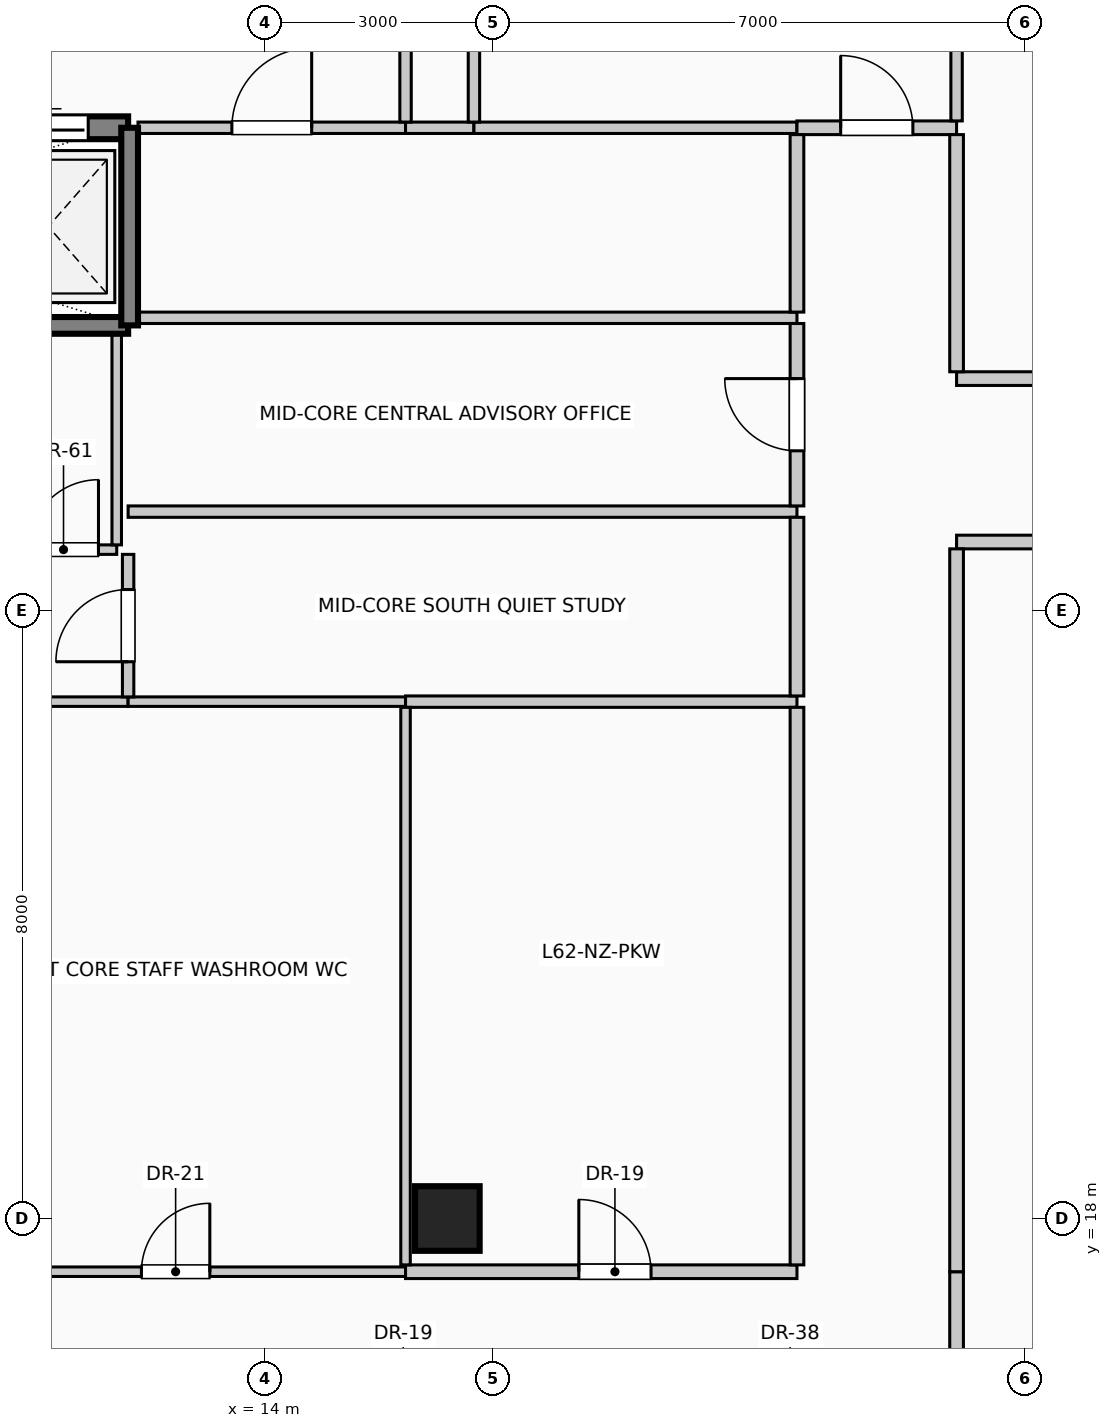
"""IFC4 building model, lengths in metres.
Left out: names, types, materials, properties, quantities, classifications, styles, units other than length and angle.
Written with IfcOpenShell. Run it as: python <this file> out.ifc"""

import sys

from ifc_helpers import new_model, si_unit, direction, frame, frame_2d, origin, origin_2d, place, context, subcontext, project, spatial, rectangle, circle, extrude, element, fill, save


model = new_model("IFC4")
c1 = context("Model", 3, precision=1e-05, world=origin(), true_north=direction((0.0, 1.0)))
c2 = subcontext(c1, "Body", "Model", "MODEL_VIEW")
j1 = project(units=[si_unit("LENGTHUNIT", "METRE"), si_unit("PLANEANGLEUNIT", "RADIAN")], contexts=[c1])
p1 = place(None, origin())
s1 = spatial("IfcSite", under=j1, at=p1, CompositionType="ELEMENT")
p2 = place(p1, origin())
s2 = spatial("IfcBuilding", under=s1, at=p2, CompositionType="ELEMENT")
p3 = place(p2, frame((0.0, 0.0, 256.6)))
s3 = spatial("IfcBuildingStorey", under=s2, at=p3, CompositionType="ELEMENT", Elevation=256.6)
p4 = place(p3, frame((16.4, 18.0, 0.0), z_axis=(0.0, 0.0, 1.0), x_axis=(1.0, 0.0, 0.0)))
e1 = element("IfcColumn", 1, at=p4, inside=s3, PredefinedType="COLUMN", context=c2, shape_type="SweptSolid", body=[
    extrude(circle(Radius=0.425, at=origin_2d()), origin(), (0.0, 0.0, 1.0), 4.0),
])
p5 = place(p3, frame((10.05, 32.35, 0.0), z_axis=(0.0, 0.0, 1.0), x_axis=(1.0, 0.0, 0.0)))
e2 = element("IfcWall", 2, at=p5, inside=s3, PredefinedType="SOLIDWALL", context=c2, shape_type="SweptSolid", body=[
    extrude(rectangle(XDim=2.15, YDim=0.3, at=frame_2d((1.075, 0.0))), origin(), (0.0, 0.0, 1.0), 4.0),
])
p6 = place(p5, frame((0.525, 0.0, 0.0)))
e3 = element("IfcOpeningElement", 3, at=p6, cuts=e2, PredefinedType="OPENING", context=c2, shape_type="SweptSolid", body=[
    extrude(rectangle(XDim=1.1, YDim=2.2, at=frame_2d((0.55, 1.1))), frame((0.0, 0.16, 0.0), z_axis=(0.0, -1.0, 0.0), x_axis=(1.0, 0.0, 0.0)), (0.0, 0.0, 1.0), 0.32),
])
p7 = place(p3, frame((3.55, 29.75, 0.0), z_axis=(0.0, 0.0, 1.0), x_axis=(1.0, 0.0, 0.0)))
e4 = element("IfcWall", 4, at=p7, inside=s3, PredefinedType="SOLIDWALL", context=c2, shape_type="SweptSolid", body=[
    extrude(rectangle(XDim=8.65, YDim=0.22, at=frame_2d((4.325, 0.0))), origin(), (0.0, 0.0, 1.0), 4.0),
])
p8 = place(p3, frame((12.22, 29.75, 0.0), z_axis=(0.0, 0.0, 1.0), x_axis=(0.0, 1.0, 0.0)))
e5 = element("IfcWall", 5, at=p8, inside=s3, PredefinedType="SOLIDWALL", context=c2, shape_type="SweptSolid", body=[
    extrude(rectangle(XDim=2.6, YDim=0.22, at=frame_2d((1.3, 0.0))), origin(), (0.0, 0.0, 1.0), 4.0),
])
p9 = place(p3, frame((9.8, 17.3, 0.0), z_axis=(0.0, 0.0, 1.0), x_axis=(1.0, 0.0, 0.0)))
e6 = element("IfcWall", 6, at=p9, inside=s3, PredefinedType="PARTITIONING", context=c2, shape_type="SweptSolid", body=[
    extrude(rectangle(XDim=6.05, YDim=0.125, at=frame_2d((3.025, 0.0))), origin(), (0.0, 0.0, 1.0), 3.75),
])
p10 = place(p9, frame((2.575, 0.0, 0.0)))
e7 = element("IfcOpeningElement", 7, at=p10, cuts=e6, PredefinedType="OPENING", context=c2, shape_type="SweptSolid", body=[
    extrude(rectangle(XDim=0.9, YDim=2.1, at=frame_2d((0.45, 1.05))), frame((0.0, 0.073, 0.0), z_axis=(0.0, -1.0, 0.0), x_axis=(1.0, 0.0, 0.0)), (0.0, 0.0, 1.0), 0.145),
])
p11 = place(p3, frame((15.85, 17.3, 0.0), z_axis=(0.0, 0.0, 1.0), x_axis=(1.0, 0.0, 0.0)))
e8 = element("IfcWall", 8, at=p11, inside=s3, PredefinedType="PARTITIONING", context=c2, shape_type="SweptSolid", body=[
    extrude(rectangle(XDim=5.15, YDim=0.18, at=frame_2d((2.575, 0.0))), origin(), (0.0, 0.0, 1.0), 3.75),
])
p12 = place(p11, frame((2.28, 0.0, 0.0)))
e9 = element("IfcOpeningElement", 9, at=p12, cuts=e8, PredefinedType="OPENING", context=c2, shape_type="SweptSolid", body=[
    extrude(rectangle(XDim=0.95, YDim=2.15, at=frame_2d((0.475, 1.075))), frame((0.0, 0.1, 0.0), z_axis=(0.0, -1.0, 0.0), x_axis=(1.0, 0.0, 0.0)), (0.0, 0.0, 1.0), 0.2),
])
p13 = place(p3, frame((9.8, 24.8, 0.0), z_axis=(0.0, 0.0, 1.0), x_axis=(1.0, 0.0, 0.0)))
e10 = element("IfcWall", 10, at=p13, inside=s3, PredefinedType="PARTITIONING", context=c2, shape_type="SweptSolid", body=[
    extrude(rectangle(XDim=2.4, YDim=0.125, at=frame_2d((1.2, 0.0))), origin(), (0.0, 0.0, 1.0), 3.75),
])
p14 = place(p3, frame((12.2, 24.8, 0.0), z_axis=(0.0, 0.0, 1.0), x_axis=(1.0, 0.0, 0.0)))
e11 = element("IfcWall", 11, at=p14, inside=s3, PredefinedType="PARTITIONING", context=c2, shape_type="SweptSolid", body=[
    extrude(rectangle(XDim=3.65, YDim=0.125, at=frame_2d((1.825, 0.0))), origin(), (0.0, 0.0, 1.0), 3.75),
])
p15 = place(p3, frame((15.85, 24.8, 0.0), z_axis=(0.0, 0.0, 1.0), x_axis=(1.0, 0.0, 0.0)))
e12 = element("IfcWall", 12, at=p15, inside=s3, PredefinedType="PARTITIONING", context=c2, shape_type="SweptSolid", body=[
    extrude(rectangle(XDim=5.15, YDim=0.15, at=frame_2d((2.575, 0.0))), origin(), (0.0, 0.0, 1.0), 3.75),
])
p16 = place(p3, frame((10.65, 26.8, 0.0), z_axis=(0.0, 0.0, 1.0), x_axis=(1.0, 0.0, 0.0)))
e13 = element("IfcWall", 13, at=p16, inside=s3, PredefinedType="PARTITIONING", context=c2, shape_type="SweptSolid", body=[
    extrude(rectangle(XDim=1.4, YDim=0.125, at=frame_2d((0.7, 0.0))), origin(), (0.0, 0.0, 1.0), 3.75),
])
p17 = place(p16, frame((0.24, 0.0, 0.0)))
e14 = element("IfcOpeningElement", 14, at=p17, cuts=e13, PredefinedType="OPENING", context=c2, shape_type="SweptSolid", body=[
    extrude(rectangle(XDim=0.92, YDim=2.1, at=frame_2d((0.46, 1.05))), frame((0.0, 0.073, 0.0), z_axis=(0.0, -1.0, 0.0), x_axis=(1.0, 0.0, 0.0)), (0.0, 0.0, 1.0), 0.145),
])
p18 = place(p3, frame((23.1, 26.9, 0.0), z_axis=(0.0, 0.0, 1.0), x_axis=(1.0, 0.0, 0.0)))
e15 = element("IfcWall", 15, at=p18, inside=s3, PredefinedType="PARTITIONING", context=c2, shape_type="SweptSolid", body=[
    extrude(rectangle(XDim=9.02, YDim=0.18, at=frame_2d((4.51, 0.0))), origin(), (0.0, 0.0, 1.0), 3.75),
])
p19 = place(p18, frame((4.035, 0.0, 0.0)))
e16 = element("IfcOpeningElement", 16, at=p19, cuts=e15, PredefinedType="OPENING", context=c2, shape_type="SweptSolid", body=[
    extrude(rectangle(XDim=0.95, YDim=2.15, at=frame_2d((0.475, 1.075))), frame((0.0, 0.1, 0.0), z_axis=(0.0, -1.0, 0.0), x_axis=(1.0, 0.0, 0.0)), (0.0, 0.0, 1.0), 0.2),
])
p20 = place(p3, frame((12.2, 27.3, 0.0), z_axis=(0.0, 0.0, 1.0), x_axis=(1.0, 0.0, 0.0)))
e17 = element("IfcWall", 17, at=p20, inside=s3, PredefinedType="PARTITIONING", context=c2, shape_type="SweptSolid", body=[
    extrude(rectangle(XDim=8.8, YDim=0.15, at=frame_2d((4.4, 0.0))), origin(), (0.0, 0.0, 1.0), 3.75),
])
p21 = place(p3, frame((23.1, 29.05, 0.0), z_axis=(0.0, 0.0, 1.0), x_axis=(1.0, 0.0, 0.0)))
e18 = element("IfcWall", 18, at=p21, inside=s3, PredefinedType="PARTITIONING", context=c2, shape_type="SweptSolid", body=[
    extrude(rectangle(XDim=7.33, YDim=0.18, at=frame_2d((3.665, 0.0))), origin(), (0.0, 0.0, 1.0), 3.75),
])
p22 = place(p21, frame((3.14, 0.0, 0.0)))
e19 = element("IfcOpeningElement", 19, at=p22, cuts=e18, PredefinedType="OPENING", context=c2, shape_type="SweptSolid", body=[
    extrude(rectangle(XDim=1.05, YDim=2.15, at=frame_2d((0.525, 1.075))), frame((0.0, 0.1, 0.0), z_axis=(0.0, -1.0, 0.0), x_axis=(1.0, 0.0, 0.0)), (0.0, 0.0, 1.0), 0.2),
])
p23 = place(p3, frame((12.33, 29.85, 0.0), z_axis=(0.0, 0.0, 1.0), x_axis=(1.0, 0.0, 0.0)))
e20 = element("IfcWall", 20, at=p23, inside=s3, PredefinedType="PARTITIONING", context=c2, shape_type="SweptSolid", body=[
    extrude(rectangle(XDim=8.67, YDim=0.15, at=frame_2d((4.335, 0.0))), origin(), (0.0, 0.0, 1.0), 3.75),
])
p24 = place(p3, frame((12.33, 32.35, 0.0), z_axis=(0.0, 0.0, 1.0), x_axis=(1.0, 0.0, 0.0)))
e21 = element("IfcWall", 21, at=p24, inside=s3, PredefinedType="PARTITIONING", context=c2, shape_type="SweptSolid", body=[
    extrude(rectangle(XDim=3.52, YDim=0.15, at=frame_2d((1.76, 0.0))), origin(), (0.0, 0.0, 1.0), 3.75),
])
p25 = place(p24, frame((1.235, 0.0, 0.0)))
e22 = element("IfcOpeningElement", 22, at=p25, cuts=e21, PredefinedType="OPENING", context=c2, shape_type="SweptSolid", body=[
    extrude(rectangle(XDim=1.05, YDim=2.15, at=frame_2d((0.525, 1.075))), frame((0.0, 0.085, 0.0), z_axis=(0.0, -1.0, 0.0), x_axis=(1.0, 0.0, 0.0)), (0.0, 0.0, 1.0), 0.17),
])
p26 = place(p3, frame((15.85, 32.35, 0.0), z_axis=(0.0, 0.0, 1.0), x_axis=(1.0, 0.0, 0.0)))
e23 = element("IfcWall", 23, at=p26, inside=s3, PredefinedType="PARTITIONING", context=c2, shape_type="SweptSolid", body=[
    extrude(rectangle(XDim=0.9, YDim=0.15, at=frame_2d((0.45, 0.0))), origin(), (0.0, 0.0, 1.0), 3.75),
])
p27 = place(p3, frame((16.75, 32.35, 0.0), z_axis=(0.0, 0.0, 1.0), x_axis=(1.0, 0.0, 0.0)))
e24 = element("IfcWall", 24, at=p27, inside=s3, PredefinedType="PARTITIONING", context=c2, shape_type="SweptSolid", body=[
    extrude(rectangle(XDim=4.25, YDim=0.15, at=frame_2d((2.125, 0.0))), origin(), (0.0, 0.0, 1.0), 3.75),
])
p28 = place(p3, frame((21.0, 32.35, 0.0), z_axis=(0.0, 0.0, 1.0), x_axis=(1.0, 0.0, 0.0)))
e25 = element("IfcWall", 25, at=p28, inside=s3, PredefinedType="PARTITIONING", context=c2, shape_type="SweptSolid", body=[
    extrude(rectangle(XDim=2.1, YDim=0.18, at=frame_2d((1.05, 0.0))), origin(), (0.0, 0.0, 1.0), 3.75),
])
p29 = place(p28, frame((0.575, 0.0, 0.0)))
e26 = element("IfcOpeningElement", 26, at=p29, cuts=e25, PredefinedType="OPENING", context=c2, shape_type="SweptSolid", body=[
    extrude(rectangle(XDim=0.95, YDim=2.15, at=frame_2d((0.475, 1.075))), frame((0.0, 0.1, 0.0), z_axis=(0.0, -1.0, 0.0), x_axis=(1.0, 0.0, 0.0)), (0.0, 0.0, 1.0), 0.2),
])
p30 = place(p3, frame((12.05, 26.863, 0.0), z_axis=(0.0, 0.0, 1.0), x_axis=(0.0, 1.0, 0.0)))
e27 = element("IfcWall", 27, at=p30, inside=s3, PredefinedType="PARTITIONING", context=c2, shape_type="SweptSolid", body=[
    extrude(rectangle(XDim=2.777, YDim=0.125, at=frame_2d((1.389, 0.0))), origin(), (0.0, 0.0, 1.0), 3.75),
])
p31 = place(p3, frame((12.2, 24.863, 0.0), z_axis=(0.0, 0.0, 1.0), x_axis=(0.0, 1.0, 0.0)))
e28 = element("IfcWall", 28, at=p31, inside=s3, PredefinedType="PARTITIONING", context=c2, shape_type="SweptSolid", body=[
    extrude(rectangle(XDim=1.875, YDim=0.15, at=frame_2d((0.938, 0.0))), origin(), (0.0, 0.0, 1.0), 3.75),
])
p32 = place(p31, frame((0.462, 0.0, 0.0)))
e29 = element("IfcOpeningElement", 29, at=p32, cuts=e28, PredefinedType="OPENING", context=c2, shape_type="SweptSolid", body=[
    extrude(rectangle(XDim=0.95, YDim=2.15, at=frame_2d((0.475, 1.075))), frame((0.0, 0.085, 0.0), z_axis=(0.0, -1.0, 0.0), x_axis=(1.0, 0.0, 0.0)), (0.0, 0.0, 1.0), 0.17),
])
p33 = place(p3, frame((15.85, 17.39, 0.0), z_axis=(0.0, 0.0, 1.0), x_axis=(0.0, 1.0, 0.0)))
e30 = element("IfcWall", 30, at=p33, inside=s3, PredefinedType="PARTITIONING", context=c2, shape_type="SweptSolid", body=[
    extrude(rectangle(XDim=7.335, YDim=0.125, at=frame_2d((3.667, 0.0))), origin(), (0.0, 0.0, 1.0), 3.75),
])
p34 = place(p3, frame((15.85, 32.425, 0.0), z_axis=(0.0, 0.0, 1.0), x_axis=(0.0, 1.0, 0.0)))
e31 = element("IfcWall", 31, at=p34, inside=s3, PredefinedType="PARTITIONING", context=c2, shape_type="SweptSolid", body=[
    extrude(rectangle(XDim=1.725, YDim=0.15, at=frame_2d((0.862, 0.0))), origin(), (0.0, 0.0, 1.0), 3.75),
])
p35 = place(p3, frame((16.75, 32.425, 0.0), z_axis=(0.0, 0.0, 1.0), x_axis=(0.0, 1.0, 0.0)))
e32 = element("IfcWall", 32, at=p35, inside=s3, PredefinedType="PARTITIONING", context=c2, shape_type="SweptSolid", body=[
    extrude(rectangle(XDim=1.15, YDim=0.15, at=frame_2d((0.575, 0.0))), origin(), (0.0, 0.0, 1.0), 3.75),
])
p36 = place(p3, frame((21.0, 17.39, 0.0), z_axis=(0.0, 0.0, 1.0), x_axis=(0.0, 1.0, 0.0)))
e33 = element("IfcWall", 33, at=p36, inside=s3, PredefinedType="PARTITIONING", context=c2, shape_type="SweptSolid", body=[
    extrude(rectangle(XDim=7.335, YDim=0.18, at=frame_2d((3.667, 0.0))), origin(), (0.0, 0.0, 1.0), 3.75),
])
p37 = place(p3, frame((21.0, 24.875, 0.0), z_axis=(0.0, 0.0, 1.0), x_axis=(0.0, 1.0, 0.0)))
e34 = element("IfcWall", 34, at=p37, inside=s3, PredefinedType="PARTITIONING", context=c2, shape_type="SweptSolid", body=[
    extrude(rectangle(XDim=2.35, YDim=0.18, at=frame_2d((1.175, 0.0))), origin(), (0.0, 0.0, 1.0), 3.75),
])
p38 = place(p3, frame((21.0, 27.375, 0.0), z_axis=(0.0, 0.0, 1.0), x_axis=(0.0, 1.0, 0.0)))
e35 = element("IfcWall", 35, at=p38, inside=s3, PredefinedType="PARTITIONING", context=c2, shape_type="SweptSolid", body=[
    extrude(rectangle(XDim=2.4, YDim=0.18, at=frame_2d((1.2, 0.0))), origin(), (0.0, 0.0, 1.0), 3.75),
])
p39 = place(p38, frame((0.725, 0.0, 0.0)))
e36 = element("IfcOpeningElement", 36, at=p39, cuts=e35, PredefinedType="OPENING", context=c2, shape_type="SweptSolid", body=[
    extrude(rectangle(XDim=0.95, YDim=2.15, at=frame_2d((0.475, 1.075))), frame((0.0, 0.1, 0.0), z_axis=(0.0, -1.0, 0.0), x_axis=(1.0, 0.0, 0.0)), (0.0, 0.0, 1.0), 0.2),
])
p40 = place(p3, frame((21.0, 29.925, 0.0), z_axis=(0.0, 0.0, 1.0), x_axis=(0.0, 1.0, 0.0)))
e37 = element("IfcWall", 37, at=p40, inside=s3, PredefinedType="PARTITIONING", context=c2, shape_type="SweptSolid", body=[
    extrude(rectangle(XDim=2.335, YDim=0.18, at=frame_2d((1.167, 0.0))), origin(), (0.0, 0.0, 1.0), 3.75),
])
p41 = place(p3, frame((23.1, 15.29, 0.0), z_axis=(0.0, 0.0, 1.0), x_axis=(0.0, 1.0, 0.0)))
e38 = element("IfcWall", 38, at=p41, inside=s3, PredefinedType="PARTITIONING", context=c2, shape_type="SweptSolid", body=[
    extrude(rectangle(XDim=2.01, YDim=0.18, at=frame_2d((1.005, 0.0))), origin(), (0.0, 0.0, 1.0), 3.75),
])
p42 = place(p3, frame((23.1, 17.3, 0.0), z_axis=(0.0, 0.0, 1.0), x_axis=(0.0, 1.0, 0.0)))
e39 = element("IfcWall", 39, at=p42, inside=s3, PredefinedType="PARTITIONING", context=c2, shape_type="SweptSolid", body=[
    extrude(rectangle(XDim=9.51, YDim=0.18, at=frame_2d((4.755, 0.0))), origin(), (0.0, 0.0, 1.0), 3.75),
])
p43 = place(p3, frame((23.1, 29.14, 0.0), z_axis=(0.0, 0.0, 1.0), x_axis=(0.0, 1.0, 0.0)))
e40 = element("IfcWall", 40, at=p43, inside=s3, PredefinedType="PARTITIONING", context=c2, shape_type="SweptSolid", body=[
    extrude(rectangle(XDim=3.12, YDim=0.18, at=frame_2d((1.56, 0.0))), origin(), (0.0, 0.0, 1.0), 3.75),
])
p44 = place(p3, frame((23.1, 32.44, 0.0), z_axis=(0.0, 0.0, 1.0), x_axis=(0.0, 1.0, 0.0)))
e41 = element("IfcWall", 41, at=p44, inside=s3, PredefinedType="PARTITIONING", context=c2, shape_type="SweptSolid", body=[
    extrude(rectangle(XDim=12.84, YDim=0.15, at=frame_2d((6.42, 0.0))), origin(), (0.0, 0.0, 1.0), 3.75),
])
p45 = place(p6, origin())
e42 = element("IfcDoor", 42, at=p45, inside=s3, OperationType="SLIDING_TO_RIGHT", PredefinedType="DOOR", context=c2, shape_type="SweptSolid", body=[
    extrude(rectangle(XDim=1.1, YDim=2.2, at=frame_2d((0.55, 1.1))), frame((0.0, 0.025, 0.0), z_axis=(0.0, -1.0, 0.0), x_axis=(1.0, 0.0, 0.0)), (0.0, 0.0, 1.0), 0.05),
])
fill(e3, e42)
p46 = place(p10, origin())
e43 = element("IfcDoor", 43, at=p46, inside=s3, OperationType="SINGLE_SWING_RIGHT", PredefinedType="DOOR", context=c2, shape_type="SweptSolid", body=[
    extrude(rectangle(XDim=0.9, YDim=2.1, at=frame_2d((0.45, 1.05))), frame((0.0, 0.025, 0.0), z_axis=(0.0, -1.0, 0.0), x_axis=(1.0, 0.0, 0.0)), (0.0, 0.0, 1.0), 0.05),
])
fill(e7, e43)
p47 = place(p12, origin())
e44 = element("IfcDoor", 44, at=p47, inside=s3, OperationType="SINGLE_SWING_LEFT", PredefinedType="DOOR", context=c2, shape_type="SweptSolid", body=[
    extrude(rectangle(XDim=0.95, YDim=2.15, at=frame_2d((0.475, 1.075))), frame((0.0, 0.025, 0.0), z_axis=(0.0, -1.0, 0.0), x_axis=(1.0, 0.0, 0.0)), (0.0, 0.0, 1.0), 0.05),
])
fill(e9, e44)
p48 = place(p17, origin())
e45 = element("IfcDoor", 45, at=p48, inside=s3, OperationType="SINGLE_SWING_RIGHT", PredefinedType="DOOR", context=c2, shape_type="SweptSolid", body=[
    extrude(rectangle(XDim=0.92, YDim=2.1, at=frame_2d((0.46, 1.05))), frame((0.0, 0.025, 0.0), z_axis=(0.0, -1.0, 0.0), x_axis=(1.0, 0.0, 0.0)), (0.0, 0.0, 1.0), 0.05),
])
fill(e14, e45)
p49 = place(p25, origin())
e46 = element("IfcDoor", 46, at=p49, inside=s3, OperationType="SINGLE_SWING_RIGHT", PredefinedType="DOOR", context=c2, shape_type="SweptSolid", body=[
    extrude(rectangle(XDim=1.05, YDim=2.15, at=frame_2d((0.525, 1.075))), frame((0.0, 0.025, 0.0), z_axis=(0.0, -1.0, 0.0), x_axis=(1.0, 0.0, 0.0)), (0.0, 0.0, 1.0), 0.05),
])
fill(e22, e46)
p50 = place(p29, origin())
e47 = element("IfcDoor", 47, at=p50, inside=s3, OperationType="SINGLE_SWING_LEFT", PredefinedType="DOOR", context=c2, shape_type="SweptSolid", body=[
    extrude(rectangle(XDim=0.95, YDim=2.15, at=frame_2d((0.475, 1.075))), frame((0.0, 0.025, 0.0), z_axis=(0.0, -1.0, 0.0), x_axis=(1.0, 0.0, 0.0)), (0.0, 0.0, 1.0), 0.05),
])
fill(e26, e47)
p51 = place(p32, origin())
e48 = element("IfcDoor", 48, at=p51, inside=s3, OperationType="SINGLE_SWING_LEFT", PredefinedType="DOOR", context=c2, shape_type="SweptSolid", body=[
    extrude(rectangle(XDim=0.95, YDim=2.15, at=frame_2d((0.475, 1.075))), frame((0.0, 0.025, 0.0), z_axis=(0.0, -1.0, 0.0), x_axis=(1.0, 0.0, 0.0)), (0.0, 0.0, 1.0), 0.05),
])
fill(e29, e48)
p52 = place(p39, origin())
e49 = element("IfcDoor", 49, at=p52, inside=s3, OperationType="SINGLE_SWING_RIGHT", PredefinedType="DOOR", context=c2, shape_type="SweptSolid", body=[
    extrude(rectangle(XDim=0.95, YDim=2.15, at=frame_2d((0.475, 1.075))), frame((0.0, 0.025, 0.0), z_axis=(0.0, -1.0, 0.0), x_axis=(1.0, 0.0, 0.0)), (0.0, 0.0, 1.0), 0.05),
])
fill(e36, e49)
save(model, sys.argv[1])
